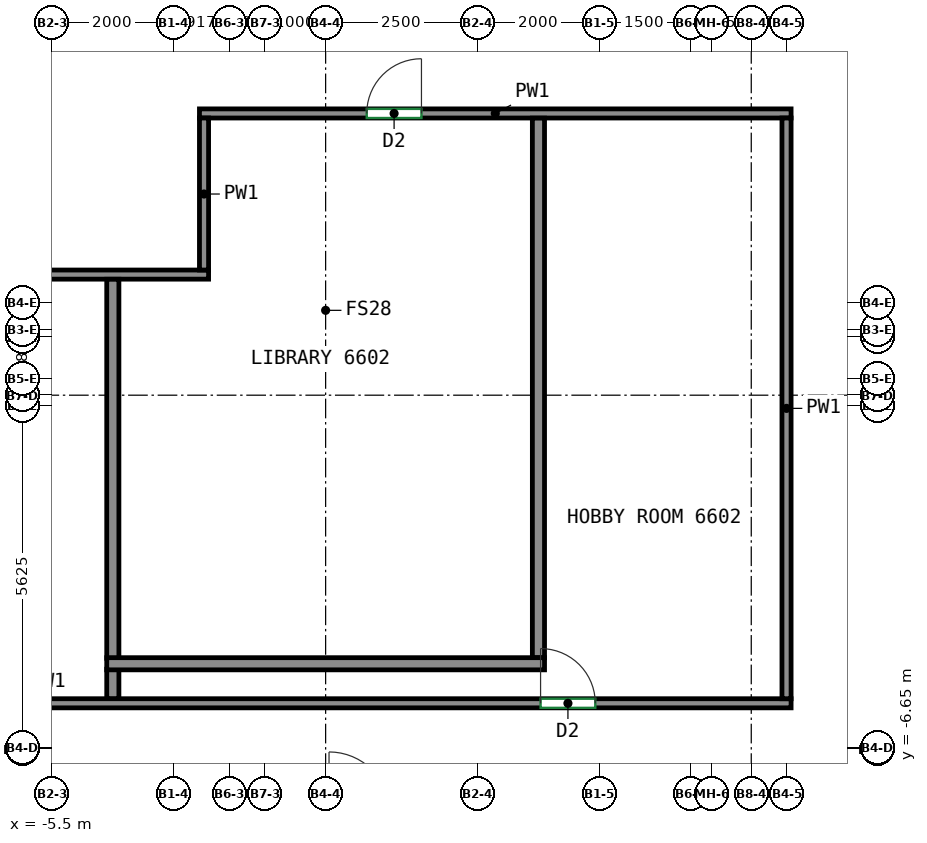
"""IFC4 building model, lengths in metres.
Left out: names, types, materials, properties, quantities, classifications, styles, units other than length and angle.
Written with IfcOpenShell. Run it as: python <this file> out.ifc"""

import sys

from ifc_helpers import new_model, si_unit, direction, frame, frame_2d, origin, place, context, subcontext, project, spatial, rectangle, extrude, element, fill, save


model = new_model("IFC4")
c1 = context("Model", 3, precision=1e-05, world=origin(), true_north=direction((0.0, 1.0)))
c2 = subcontext(c1, "Body", "Model", "MODEL_VIEW")
j1 = project(units=[si_unit("LENGTHUNIT", "METRE"), si_unit("PLANEANGLEUNIT", "RADIAN")], contexts=[c1])
p1 = place(None, origin())
s1 = spatial("IfcSite", under=j1, at=p1, CompositionType="ELEMENT")
p2 = place(p1, origin())
s2 = spatial("IfcBuilding", under=s1, at=p2, CompositionType="ELEMENT")
p3 = place(p2, frame((0.0, 0.0, 270.4)))
s3 = spatial("IfcBuildingStorey", under=s2, at=p3, CompositionType="ELEMENT", Elevation=270.4)
p4 = place(p3, frame((-19.0, -5.9, 0.0), z_axis=(0.0, 0.0, 1.0), x_axis=(1.0, 0.0, 0.0)))
e1 = element("IfcWall", 1, at=p4, inside=s3, PredefinedType="PARTITIONING", context=c2, shape_type="SweptSolid", body=[
    extrude(rectangle(XDim=25.655, YDim=0.15, at=frame_2d((12.828, 0.0))), origin(), (0.0, 0.0, 1.0), 3.12),
])
p5 = place(p4, frame((4.796, 0.0, 0.0)))
e2 = element("IfcOpeningElement", 2, at=p5, cuts=e1, PredefinedType="OPENING", context=c2, shape_type="SweptSolid", body=[
    extrude(rectangle(XDim=0.9, YDim=2.1, at=frame_2d((0.45, 1.05))), frame((0.0, 0.085, 0.0), z_axis=(0.0, -1.0, 0.0), x_axis=(1.0, 0.0, 0.0)), (0.0, 0.0, 1.0), 0.17),
])
p6 = place(p4, frame((21.535, 0.0, 0.0)))
e3 = element("IfcOpeningElement", 3, at=p6, cuts=e1, PredefinedType="OPENING", context=c2, shape_type="SweptSolid", body=[
    extrude(rectangle(XDim=0.9, YDim=2.1, at=frame_2d((0.45, 1.05))), frame((0.0, 0.085, 0.0), z_axis=(0.0, -1.0, 0.0), x_axis=(1.0, 0.0, 0.0)), (0.0, 0.0, 1.0), 0.17),
])
p7 = place(p3, frame((-14.335, 1.15, 0.0), z_axis=(0.0, 0.0, 1.0), x_axis=(1.0, 0.0, 0.0)))
e4 = element("IfcWall", 4, at=p7, inside=s3, PredefinedType="PARTITIONING", context=c2, shape_type="SweptSolid", body=[
    extrude(rectangle(XDim=11.41, YDim=0.15, at=frame_2d((5.705, 0.0))), origin(), (0.0, 0.0, 1.0), 3.12),
])
p8 = place(p3, frame((-3.075, 3.8, 0.0), z_axis=(0.0, 0.0, 1.0), x_axis=(1.0, 0.0, 0.0)))
e5 = element("IfcWall", 5, at=p8, inside=s3, PredefinedType="PARTITIONING", context=c2, shape_type="SweptSolid", body=[
    extrude(rectangle(XDim=9.73, YDim=0.15, at=frame_2d((4.865, 0.0))), origin(), (0.0, 0.0, 1.0), 3.12),
])
p9 = place(p8, frame((2.751, 0.0, 0.0)))
e6 = element("IfcOpeningElement", 6, at=p9, cuts=e5, PredefinedType="OPENING", context=c2, shape_type="SweptSolid", body=[
    extrude(rectangle(XDim=0.9, YDim=2.1, at=frame_2d((0.45, 1.05))), frame((0.0, 0.085, 0.0), z_axis=(0.0, -1.0, 0.0), x_axis=(1.0, 0.0, 0.0)), (0.0, 0.0, 1.0), 0.17),
])
p10 = place(p3, frame((-3.0, 1.225, 0.0), z_axis=(0.0, 0.0, 1.0), x_axis=(0.0, 1.0, 0.0)))
e7 = element("IfcWall", 7, at=p10, inside=s3, PredefinedType="PARTITIONING", context=c2, shape_type="SweptSolid", body=[
    extrude(rectangle(XDim=2.5, YDim=0.15, at=frame_2d((1.25, 0.0))), origin(), (0.0, 0.0, 1.0), 3.12),
])
p11 = place(p3, frame((6.58, 3.725, 0.0), z_axis=(0.0, 0.0, 1.0), x_axis=(0.0, -1.0, 0.0)))
e8 = element("IfcWall", 8, at=p11, inside=s3, PredefinedType="PARTITIONING", context=c2, shape_type="SweptSolid", body=[
    extrude(rectangle(XDim=9.55, YDim=0.15, at=frame_2d((4.775, 0.0))), origin(), (0.0, 0.0, 1.0), 3.12),
])
p12 = place(p3, frame((-4.5, -5.16, 0.0), z_axis=(0.0, 0.0, 1.0), x_axis=(0.0, 1.0, 0.0)))
e9 = element("IfcWall", 9, at=p12, inside=s3, PredefinedType="PARTITIONING", context=c2, shape_type="SweptSolid", body=[
    extrude(rectangle(XDim=6.233, YDim=0.2, at=frame_2d((3.116, 0.0))), origin(), (0.0, 0.0, 1.0), 3.12),
])
p13 = place(p3, frame((-4.5, -5.823, 0.0), z_axis=(0.0, 0.0, 1.0), x_axis=(0.0, 1.0, 0.0)))
e10 = element("IfcWall", 10, at=p13, inside=s3, PredefinedType="PARTITIONING", context=c2, shape_type="SweptSolid", body=[
    extrude(rectangle(XDim=0.483, YDim=0.2, at=frame_2d((0.241, 0.0))), origin(), (0.0, 0.0, 1.0), 3.12),
])
p14 = place(p3, frame((2.5, -5.15, 0.0), z_axis=(0.0, 0.0, 1.0), x_axis=(0.0, 1.0, 0.0)))
e11 = element("IfcWall", 11, at=p14, inside=s3, PredefinedType="PARTITIONING", context=c2, shape_type="SweptSolid", body=[
    extrude(rectangle(XDim=8.873, YDim=0.2, at=frame_2d((4.437, 0.0))), origin(), (0.0, 0.0, 1.0), 3.12),
])
p15 = place(p3, frame((-4.6, -5.25, 0.0), z_axis=(0.0, 0.0, 1.0), x_axis=(1.0, 0.0, 0.0)))
e12 = element("IfcWall", 12, at=p15, inside=s3, PredefinedType="PARTITIONING", context=c2, shape_type="SweptSolid", body=[
    extrude(rectangle(XDim=7.2, YDim=0.2, at=frame_2d((3.6, 0.0))), origin(), (0.0, 0.0, 1.0), 3.12),
])
p16 = place(p6, origin())
e13 = element("IfcDoor", 13, at=p16, inside=s3, OperationType="SINGLE_SWING_LEFT", PredefinedType="DOOR", context=c2, shape_type="SweptSolid", body=[
    extrude(rectangle(XDim=0.9, YDim=2.1, at=frame_2d((0.45, 1.05))), frame((0.0, 0.025, 0.0), z_axis=(0.0, -1.0, 0.0), x_axis=(1.0, 0.0, 0.0)), (0.0, 0.0, 1.0), 0.05),
])
fill(e3, e13)
p17 = place(p9, origin())
e14 = element("IfcDoor", 14, at=p17, inside=s3, OperationType="SINGLE_SWING_RIGHT", PredefinedType="DOOR", context=c2, shape_type="SweptSolid", body=[
    extrude(rectangle(XDim=0.9, YDim=2.1, at=frame_2d((0.45, 1.05))), frame((0.0, 0.025, 0.0), z_axis=(0.0, -1.0, 0.0), x_axis=(1.0, 0.0, 0.0)), (0.0, 0.0, 1.0), 0.05),
])
fill(e6, e14)
save(model, sys.argv[1])
